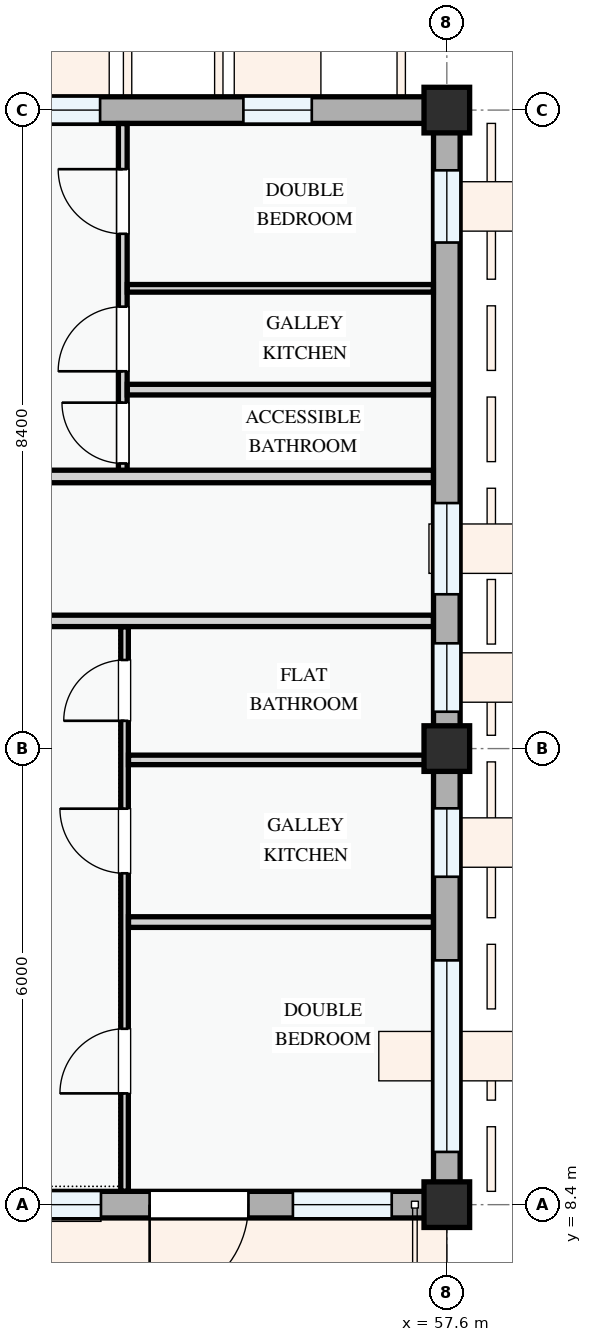
"""IFC4 building model, lengths in metres.
Left out: names, types, materials, properties, quantities, classifications, styles, units other than length and angle.
Written with IfcOpenShell. Run it as: python <this file> out.ifc"""

import sys

from ifc_helpers import new_model, si_unit, direction, frame, frame_2d, origin, origin_2d, place, context, subcontext, project, spatial, rectangle, extrude, element, fill, save


model = new_model("IFC4")
c1 = context("Model", 3, precision=1e-05, world=origin(), true_north=direction((0.0, 1.0)))
c2 = subcontext(c1, "Body", "Model", "MODEL_VIEW")
j1 = project(units=[si_unit("LENGTHUNIT", "METRE"), si_unit("PLANEANGLEUNIT", "RADIAN")], contexts=[c1])
p1 = place(None, origin())
s1 = spatial("IfcSite", under=j1, at=p1, CompositionType="ELEMENT")
p2 = place(p1, origin())
s2 = spatial("IfcBuilding", under=s1, at=p2, CompositionType="ELEMENT")
p3 = place(p2, frame((0.0, 0.0, 8.1)))
s3 = spatial("IfcBuildingStorey", under=s2, at=p3, CompositionType="ELEMENT", Elevation=8.1)
for number, where, z_axis, x_axis in (
    (1, (57.6, 8.4, 0.0), (0.0, 0.0, 1.0), (1.0, 0.0, 0.0)),
    (2, (57.6, 14.4, 0.0), (0.0, 0.0, 1.0), (1.0, 0.0, 0.0)),
    (3, (57.6, 22.8, 0.0), (0.0, 0.0, 1.0), (1.0, 0.0, 0.0)),
):
    element("IfcColumn", number, at=place(p3, frame(where, z_axis=z_axis, x_axis=x_axis)), inside=s3, PredefinedType="COLUMN", context=c2, shape_type="SweptSolid", body=[
        extrude(rectangle(XDim=0.6, YDim=0.6, at=origin_2d()), origin(), (0.0, 0.0, 1.0), 3.3),
    ])
p4 = place(p3, frame((51.6, 8.4, 0.0), z_axis=(0.0, 0.0, 1.0), x_axis=(1.0, 0.0, 0.0)))
e4 = element("IfcWall", 4, at=p4, inside=s3, PredefinedType="STANDARD", context=c2, shape_type="SweptSolid", body=[
    extrude(rectangle(XDim=6.0, YDim=0.35, at=frame_2d((3.0, 0.0))), origin(), (0.0, 0.0, 1.0), 2.475),
])
p5 = place(p4, frame((2.09, 0.0, 0.0)))
e5 = element("IfcOpeningElement", 5, at=p5, cuts=e4, PredefinedType="OPENING", context=c2, shape_type="SweptSolid", body=[
    extrude(rectangle(XDim=1.3, YDim=2.15, at=frame_2d((0.65, 1.075))), frame((0.0, 0.185, 0.0), z_axis=(0.0, -1.0, 0.0), x_axis=(1.0, 0.0, 0.0)), (0.0, 0.0, 1.0), 0.37),
])
p6 = place(p4, frame((0.5, 0.0, 0.78)))
e6 = element("IfcOpeningElement", 6, at=p6, cuts=e4, PredefinedType="OPENING", context=c2, shape_type="SweptSolid", body=[
    extrude(rectangle(XDim=0.95, YDim=1.15, at=frame_2d((0.475, 0.575))), frame((0.0, 0.185, 0.0), z_axis=(0.0, -1.0, 0.0), x_axis=(1.0, 0.0, 0.0)), (0.0, 0.0, 1.0), 0.37),
])
p7 = place(p4, frame((3.975, 0.0, 0.78)))
e7 = element("IfcOpeningElement", 7, at=p7, cuts=e4, PredefinedType="OPENING", context=c2, shape_type="SweptSolid", body=[
    extrude(rectangle(XDim=1.3, YDim=1.4, at=frame_2d((0.65, 0.7))), frame((0.0, 0.185, 0.0), z_axis=(0.0, -1.0, 0.0), x_axis=(1.0, 0.0, 0.0)), (0.0, 0.0, 1.0), 0.37),
])
p8 = place(p3, frame((57.6, 8.4, 0.0), z_axis=(0.0, 0.0, 1.0), x_axis=(0.0, 1.0, 0.0)))
e8 = element("IfcWall", 8, at=p8, inside=s3, PredefinedType="STANDARD", context=c2, shape_type="SweptSolid", body=[
    extrude(rectangle(XDim=6.0, YDim=0.35, at=frame_2d((3.0, 0.0))), origin(), (0.0, 0.0, 1.0), 2.575),
])
p9 = place(p8, frame((0.694, 0.0, 0.78)))
e9 = element("IfcOpeningElement", 9, at=p9, cuts=e8, PredefinedType="OPENING", context=c2, shape_type="SweptSolid", body=[
    extrude(rectangle(XDim=2.52, YDim=1.5, at=frame_2d((1.26, 0.75))), frame((0.0, 0.185, 0.0), z_axis=(0.0, -1.0, 0.0), x_axis=(1.0, 0.0, 0.0)), (0.0, 0.0, 1.0), 0.37),
])
p10 = place(p8, frame((4.314, 0.0, 0.78)))
e10 = element("IfcOpeningElement", 10, at=p10, cuts=e8, PredefinedType="OPENING", context=c2, shape_type="SweptSolid", body=[
    extrude(rectangle(XDim=0.9, YDim=1.2, at=frame_2d((0.45, 0.6))), frame((0.0, 0.185, 0.0), z_axis=(0.0, -1.0, 0.0), x_axis=(1.0, 0.0, 0.0)), (0.0, 0.0, 1.0), 0.37),
])
p11 = place(p3, frame((57.6, 14.4, 0.0), z_axis=(0.0, 0.0, 1.0), x_axis=(0.0, 1.0, 0.0)))
e11 = element("IfcWall", 11, at=p11, inside=s3, PredefinedType="STANDARD", context=c2, shape_type="SweptSolid", body=[
    extrude(rectangle(XDim=8.4, YDim=0.35, at=frame_2d((4.2, 0.0))), origin(), (0.0, 0.0, 1.0), 2.425),
])
p12 = place(p11, frame((0.485, 0.0, 0.78)))
e12 = element("IfcOpeningElement", 12, at=p12, cuts=e11, PredefinedType="OPENING", context=c2, shape_type="SweptSolid", body=[
    extrude(rectangle(XDim=0.9, YDim=1.2, at=frame_2d((0.45, 0.6))), frame((0.0, 0.185, 0.0), z_axis=(0.0, -1.0, 0.0), x_axis=(1.0, 0.0, 0.0)), (0.0, 0.0, 1.0), 0.37),
])
p13 = place(p11, frame((2.03, 0.0, 0.78)))
e13 = element("IfcOpeningElement", 13, at=p13, cuts=e11, PredefinedType="OPENING", context=c2, shape_type="SweptSolid", body=[
    extrude(rectangle(XDim=1.2, YDim=1.5, at=frame_2d((0.6, 0.75))), frame((0.0, 0.185, 0.0), z_axis=(0.0, -1.0, 0.0), x_axis=(1.0, 0.0, 0.0)), (0.0, 0.0, 1.0), 0.37),
])
p14 = place(p11, frame((6.658, 0.0, 0.78)))
e14 = element("IfcOpeningElement", 14, at=p14, cuts=e11, PredefinedType="OPENING", context=c2, shape_type="SweptSolid", body=[
    extrude(rectangle(XDim=0.95, YDim=1.15, at=frame_2d((0.475, 0.575))), frame((0.0, 0.185, 0.0), z_axis=(0.0, -1.0, 0.0), x_axis=(1.0, 0.0, 0.0)), (0.0, 0.0, 1.0), 0.37),
])
p15 = place(p3, frame((57.6, 22.8, 0.0), z_axis=(0.0, 0.0, 1.0), x_axis=(-1.0, 0.0, 0.0)))
e15 = element("IfcWall", 15, at=p15, inside=s3, PredefinedType="STANDARD", context=c2, shape_type="SweptSolid", body=[
    extrude(rectangle(XDim=6.0, YDim=0.35, at=frame_2d((3.0, 0.0))), origin(), (0.0, 0.0, 1.0), 2.475),
])
p16 = place(p15, frame((1.777, 0.0, 0.78)))
e16 = element("IfcOpeningElement", 16, at=p16, cuts=e15, PredefinedType="OPENING", context=c2, shape_type="SweptSolid", body=[
    extrude(rectangle(XDim=0.9, YDim=1.2, at=frame_2d((0.45, 0.6))), frame((0.0, 0.185, 0.0), z_axis=(0.0, -1.0, 0.0), x_axis=(1.0, 0.0, 0.0)), (0.0, 0.0, 1.0), 0.37),
])
p17 = place(p15, frame((4.562, 0.0, 0.78)))
e17 = element("IfcOpeningElement", 17, at=p17, cuts=e15, PredefinedType="OPENING", context=c2, shape_type="SweptSolid", body=[
    extrude(rectangle(XDim=0.95, YDim=1.15, at=frame_2d((0.475, 0.575))), frame((0.0, 0.185, 0.0), z_axis=(0.0, -1.0, 0.0), x_axis=(1.0, 0.0, 0.0)), (0.0, 0.0, 1.0), 0.37),
])
p18 = place(p3, frame((53.36, 8.577, 0.0), z_axis=(0.0, 0.0, 1.0), x_axis=(0.0, 1.0, 0.0)))
e18 = element("IfcWall", 18, at=p18, inside=s3, PredefinedType="PARTITIONING", context=c2, shape_type="SweptSolid", body=[
    extrude(rectangle(XDim=7.426, YDim=0.1, at=frame_2d((3.713, 0.0))), origin(), (0.0, 0.0, 1.0), 3.0),
])
p19 = place(p18, frame((1.287, 0.0, 0.0)))
e19 = element("IfcOpeningElement", 19, at=p19, cuts=e18, PredefinedType="OPENING", context=c2, shape_type="SweptSolid", body=[
    extrude(rectangle(XDim=0.85, YDim=2.1, at=frame_2d((0.425, 1.05))), frame((0.0, 0.06, 0.0), z_axis=(0.0, -1.0, 0.0), x_axis=(1.0, 0.0, 0.0)), (0.0, 0.0, 1.0), 0.12),
])
p20 = place(p18, frame((4.182, 0.0, 0.0)))
e20 = element("IfcOpeningElement", 20, at=p20, cuts=e18, PredefinedType="OPENING", context=c2, shape_type="SweptSolid", body=[
    extrude(rectangle(XDim=0.85, YDim=2.1, at=frame_2d((0.425, 1.05))), frame((0.0, 0.06, 0.0), z_axis=(0.0, -1.0, 0.0), x_axis=(1.0, 0.0, 0.0)), (0.0, 0.0, 1.0), 0.12),
])
p21 = place(p18, frame((6.189, 0.0, 0.0)))
e21 = element("IfcOpeningElement", 21, at=p21, cuts=e18, PredefinedType="OPENING", context=c2, shape_type="SweptSolid", body=[
    extrude(rectangle(XDim=0.8, YDim=2.1, at=frame_2d((0.4, 1.05))), frame((0.0, 0.06, 0.0), z_axis=(0.0, -1.0, 0.0), x_axis=(1.0, 0.0, 0.0)), (0.0, 0.0, 1.0), 0.12),
])
p22 = place(p3, frame((53.412, 12.118, 0.0), z_axis=(0.0, 0.0, 1.0), x_axis=(1.0, 0.0, 0.0)))
e22 = element("IfcWall", 22, at=p22, inside=s3, PredefinedType="PARTITIONING", context=c2, shape_type="SweptSolid", body=[
    extrude(rectangle(XDim=4.011, YDim=0.14, at=frame_2d((2.005, 0.0))), origin(), (0.0, 0.0, 1.0), 3.0),
])
p23 = place(p3, frame((53.412, 14.251, 0.0), z_axis=(0.0, 0.0, 1.0), x_axis=(1.0, 0.0, 0.0)))
e23 = element("IfcWall", 23, at=p23, inside=s3, PredefinedType="PARTITIONING", context=c2, shape_type="SweptSolid", body=[
    extrude(rectangle(XDim=4.011, YDim=0.125, at=frame_2d((2.005, 0.0))), origin(), (0.0, 0.0, 1.0), 2.475),
])
p24 = place(p3, frame((53.337, 17.98, 0.0), z_axis=(0.0, 0.0, 1.0), x_axis=(0.0, 1.0, 0.0)))
e24 = element("IfcWall", 24, at=p24, inside=s3, PredefinedType="PARTITIONING", context=c2, shape_type="SweptSolid", body=[
    extrude(rectangle(XDim=4.643, YDim=0.115, at=frame_2d((2.322, 0.0))), origin(), (0.0, 0.0, 1.0), 3.0),
])
p25 = place(p24, frame((0.171, 0.0, 0.0)))
e25 = element("IfcOpeningElement", 25, at=p25, cuts=e24, PredefinedType="OPENING", context=c2, shape_type="SweptSolid", body=[
    extrude(rectangle(XDim=0.8, YDim=2.1, at=frame_2d((0.4, 1.05))), frame((0.0, 0.067, 0.0), z_axis=(0.0, -1.0, 0.0), x_axis=(1.0, 0.0, 0.0)), (0.0, 0.0, 1.0), 0.135),
])
p26 = place(p24, frame((1.384, 0.0, 0.0)))
e26 = element("IfcOpeningElement", 26, at=p26, cuts=e24, PredefinedType="OPENING", context=c2, shape_type="SweptSolid", body=[
    extrude(rectangle(XDim=0.85, YDim=2.1, at=frame_2d((0.425, 1.05))), frame((0.0, 0.067, 0.0), z_axis=(0.0, -1.0, 0.0), x_axis=(1.0, 0.0, 0.0)), (0.0, 0.0, 1.0), 0.135),
])
p27 = place(p24, frame((3.193, 0.0, 0.0)))
e27 = element("IfcOpeningElement", 27, at=p27, cuts=e24, PredefinedType="OPENING", context=c2, shape_type="SweptSolid", body=[
    extrude(rectangle(XDim=0.85, YDim=2.1, at=frame_2d((0.425, 1.05))), frame((0.0, 0.067, 0.0), z_axis=(0.0, -1.0, 0.0), x_axis=(1.0, 0.0, 0.0)), (0.0, 0.0, 1.0), 0.135),
])
p28 = place(p3, frame((53.396, 20.455, 0.0), z_axis=(0.0, 0.0, 1.0), x_axis=(1.0, 0.0, 0.0)))
e28 = element("IfcWall", 28, at=p28, inside=s3, PredefinedType="PARTITIONING", context=c2, shape_type="SweptSolid", body=[
    extrude(rectangle(XDim=4.027, YDim=0.1, at=frame_2d((2.013, 0.0))), origin(), (0.0, 0.0, 1.0), 3.0),
])
p29 = place(p3, frame((53.396, 19.122, 0.0), z_axis=(0.0, 0.0, 1.0), x_axis=(1.0, 0.0, 0.0)))
e29 = element("IfcWall", 29, at=p29, inside=s3, PredefinedType="PARTITIONING", context=c2, shape_type="SweptSolid", body=[
    extrude(rectangle(XDim=4.027, YDim=0.14, at=frame_2d((2.013, 0.0))), origin(), (0.0, 0.0, 1.0), 3.0),
])
p30 = place(p3, frame((22.66, 16.08, 0.0), z_axis=(0.0, 0.0, 1.0), x_axis=(1.0, 0.0, 0.0)))
e30 = element("IfcWall", 30, at=p30, inside=s3, PredefinedType="PARTITIONING", context=c2, shape_type="SweptSolid", body=[
    extrude(rectangle(XDim=34.763, YDim=0.15, at=frame_2d((17.382, 0.0))), origin(), (0.0, 0.0, 1.0), 3.0),
])
p31 = place(p30, frame((2.672, 0.0, 0.0)))
e31 = element("IfcOpeningElement", 31, at=p31, cuts=e30, PredefinedType="OPENING", context=c2, shape_type="SweptSolid", body=[
    extrude(rectangle(XDim=0.92, YDim=2.1, at=frame_2d((0.46, 1.05))), frame((0.0, 0.085, 0.0), z_axis=(0.0, -1.0, 0.0), x_axis=(1.0, 0.0, 0.0)), (0.0, 0.0, 1.0), 0.17),
])
p32 = place(p30, frame((16.58, 0.0, 0.0)))
e32 = element("IfcOpeningElement", 32, at=p32, cuts=e30, PredefinedType="OPENING", context=c2, shape_type="SweptSolid", body=[
    extrude(rectangle(XDim=0.96, YDim=2.12, at=frame_2d((0.48, 1.06))), frame((0.0, 0.085, 0.0), z_axis=(0.0, -1.0, 0.0), x_axis=(1.0, 0.0, 0.0)), (0.0, 0.0, 1.0), 0.17),
])
p33 = place(p30, frame((24.315, 0.0, 0.0)))
e33 = element("IfcOpeningElement", 33, at=p33, cuts=e30, PredefinedType="OPENING", context=c2, shape_type="SweptSolid", body=[
    extrude(rectangle(XDim=0.92, YDim=2.1, at=frame_2d((0.46, 1.05))), frame((0.0, 0.085, 0.0), z_axis=(0.0, -1.0, 0.0), x_axis=(1.0, 0.0, 0.0)), (0.0, 0.0, 1.0), 0.17),
])
p34 = place(p3, frame((22.66, 17.98, 0.0), z_axis=(0.0, 0.0, 1.0), x_axis=(1.0, 0.0, 0.0)))
e34 = element("IfcWall", 34, at=p34, inside=s3, PredefinedType="PARTITIONING", context=c2, shape_type="SweptSolid", body=[
    extrude(rectangle(XDim=34.763, YDim=0.165, at=frame_2d((17.382, 0.0))), origin(), (0.0, 0.0, 1.0), 3.0),
])
p35 = place(p34, frame((2.633, 0.0, 0.0)))
e35 = element("IfcOpeningElement", 35, at=p35, cuts=e34, PredefinedType="OPENING", context=c2, shape_type="SweptSolid", body=[
    extrude(rectangle(XDim=0.92, YDim=2.1, at=frame_2d((0.46, 1.05))), frame((0.0, 0.093, 0.0), z_axis=(0.0, -1.0, 0.0), x_axis=(1.0, 0.0, 0.0)), (0.0, 0.0, 1.0), 0.185),
])
p36 = place(p34, frame((16.343, 0.0, 0.0)))
e36 = element("IfcOpeningElement", 36, at=p36, cuts=e34, PredefinedType="OPENING", context=c2, shape_type="SweptSolid", body=[
    extrude(rectangle(XDim=0.92, YDim=2.1, at=frame_2d((0.46, 1.05))), frame((0.0, 0.093, 0.0), z_axis=(0.0, -1.0, 0.0), x_axis=(1.0, 0.0, 0.0)), (0.0, 0.0, 1.0), 0.185),
])
p37 = place(p34, frame((24.313, 0.0, 0.0)))
e37 = element("IfcOpeningElement", 37, at=p37, cuts=e34, PredefinedType="OPENING", context=c2, shape_type="SweptSolid", body=[
    extrude(rectangle(XDim=0.92, YDim=2.1, at=frame_2d((0.46, 1.05))), frame((0.0, 0.093, 0.0), z_axis=(0.0, -1.0, 0.0), x_axis=(1.0, 0.0, 0.0)), (0.0, 0.0, 1.0), 0.185),
])
p38 = place(p5, frame((1.3, 0.0, 0.0), z_axis=(0.0, 0.0, 1.0), x_axis=(-1.0, 0.0, 0.0)))
e38 = element("IfcDoor", 38, at=p38, inside=s3, OperationType="SINGLE_SWING_RIGHT", PredefinedType="DOOR", context=c2, shape_type="SweptSolid", body=[
    extrude(rectangle(XDim=1.3, YDim=2.15, at=frame_2d((0.65, 1.075))), frame((0.0, 0.025, 0.0), z_axis=(0.0, -1.0, 0.0), x_axis=(1.0, 0.0, 0.0)), (0.0, 0.0, 1.0), 0.05),
])
fill(e5, e38)
p39 = place(p6, origin())
e39 = element("IfcWindow", 39, at=p39, inside=s3, PartitioningType="SINGLE_PANEL", PredefinedType="WINDOW", context=c2, shape_type="SweptSolid", body=[
    extrude(rectangle(XDim=0.95, YDim=1.15, at=frame_2d((0.475, 0.575))), frame((0.0, 0.03, 0.0), z_axis=(0.0, -1.0, 0.0), x_axis=(1.0, 0.0, 0.0)), (0.0, 0.0, 1.0), 0.06),
])
fill(e6, e39)
p40 = place(p7, origin())
e40 = element("IfcWindow", 40, at=p40, inside=s3, PartitioningType="SINGLE_PANEL", PredefinedType="WINDOW", context=c2, shape_type="SweptSolid", body=[
    extrude(rectangle(XDim=1.3, YDim=1.4, at=frame_2d((0.65, 0.7))), frame((0.0, 0.03, 0.0), z_axis=(0.0, -1.0, 0.0), x_axis=(1.0, 0.0, 0.0)), (0.0, 0.0, 1.0), 0.06),
])
fill(e7, e40)
p41 = place(p9, origin())
e41 = element("IfcWindow", 41, at=p41, inside=s3, PartitioningType="DOUBLE_PANEL_VERTICAL", PredefinedType="WINDOW", context=c2, shape_type="SweptSolid", body=[
    extrude(rectangle(XDim=2.52, YDim=1.5, at=frame_2d((1.26, 0.75))), frame((0.0, 0.03, 0.0), z_axis=(0.0, -1.0, 0.0), x_axis=(1.0, 0.0, 0.0)), (0.0, 0.0, 1.0), 0.06),
])
fill(e9, e41)
p42 = place(p10, origin())
e42 = element("IfcWindow", 42, at=p42, inside=s3, PartitioningType="SINGLE_PANEL", PredefinedType="WINDOW", context=c2, shape_type="SweptSolid", body=[
    extrude(rectangle(XDim=0.9, YDim=1.2, at=frame_2d((0.45, 0.6))), frame((0.0, 0.03, 0.0), z_axis=(0.0, -1.0, 0.0), x_axis=(1.0, 0.0, 0.0)), (0.0, 0.0, 1.0), 0.06),
])
fill(e10, e42)
p43 = place(p12, origin())
e43 = element("IfcWindow", 43, at=p43, inside=s3, PartitioningType="SINGLE_PANEL", PredefinedType="WINDOW", context=c2, shape_type="SweptSolid", body=[
    extrude(rectangle(XDim=0.9, YDim=1.2, at=frame_2d((0.45, 0.6))), frame((0.0, 0.03, 0.0), z_axis=(0.0, -1.0, 0.0), x_axis=(1.0, 0.0, 0.0)), (0.0, 0.0, 1.0), 0.06),
])
fill(e12, e43)
p44 = place(p13, origin())
e44 = element("IfcWindow", 44, at=p44, inside=s3, PartitioningType="SINGLE_PANEL", PredefinedType="WINDOW", context=c2, shape_type="SweptSolid", body=[
    extrude(rectangle(XDim=1.2, YDim=1.5, at=frame_2d((0.6, 0.75))), frame((0.0, 0.03, 0.0), z_axis=(0.0, -1.0, 0.0), x_axis=(1.0, 0.0, 0.0)), (0.0, 0.0, 1.0), 0.06),
])
fill(e13, e44)
p45 = place(p14, origin())
e45 = element("IfcWindow", 45, at=p45, inside=s3, PartitioningType="SINGLE_PANEL", PredefinedType="WINDOW", context=c2, shape_type="SweptSolid", body=[
    extrude(rectangle(XDim=0.95, YDim=1.15, at=frame_2d((0.475, 0.575))), frame((0.0, 0.03, 0.0), z_axis=(0.0, -1.0, 0.0), x_axis=(1.0, 0.0, 0.0)), (0.0, 0.0, 1.0), 0.06),
])
fill(e14, e45)
p46 = place(p16, origin())
e46 = element("IfcWindow", 46, at=p46, inside=s3, PartitioningType="SINGLE_PANEL", PredefinedType="WINDOW", context=c2, shape_type="SweptSolid", body=[
    extrude(rectangle(XDim=0.9, YDim=1.2, at=frame_2d((0.45, 0.6))), frame((0.0, 0.03, 0.0), z_axis=(0.0, -1.0, 0.0), x_axis=(1.0, 0.0, 0.0)), (0.0, 0.0, 1.0), 0.06),
])
fill(e16, e46)
p47 = place(p17, origin())
e47 = element("IfcWindow", 47, at=p47, inside=s3, PartitioningType="SINGLE_PANEL", PredefinedType="WINDOW", context=c2, shape_type="SweptSolid", body=[
    extrude(rectangle(XDim=0.95, YDim=1.15, at=frame_2d((0.475, 0.575))), frame((0.0, 0.03, 0.0), z_axis=(0.0, -1.0, 0.0), x_axis=(1.0, 0.0, 0.0)), (0.0, 0.0, 1.0), 0.06),
])
fill(e17, e47)
p48 = place(p19, origin())
e48 = element("IfcDoor", 48, at=p48, inside=s3, OperationType="SINGLE_SWING_LEFT", PredefinedType="DOOR", context=c2, shape_type="SweptSolid", body=[
    extrude(rectangle(XDim=0.85, YDim=2.1, at=frame_2d((0.425, 1.05))), frame((0.0, 0.025, 0.0), z_axis=(0.0, -1.0, 0.0), x_axis=(1.0, 0.0, 0.0)), (0.0, 0.0, 1.0), 0.05),
])
fill(e19, e48)
p49 = place(p20, origin())
e49 = element("IfcDoor", 49, at=p49, inside=s3, OperationType="SINGLE_SWING_RIGHT", PredefinedType="DOOR", context=c2, shape_type="SweptSolid", body=[
    extrude(rectangle(XDim=0.85, YDim=2.1, at=frame_2d((0.425, 1.05))), frame((0.0, 0.025, 0.0), z_axis=(0.0, -1.0, 0.0), x_axis=(1.0, 0.0, 0.0)), (0.0, 0.0, 1.0), 0.05),
])
fill(e20, e49)
p50 = place(p21, origin())
e50 = element("IfcDoor", 50, at=p50, inside=s3, OperationType="SINGLE_SWING_LEFT", PredefinedType="DOOR", context=c2, shape_type="SweptSolid", body=[
    extrude(rectangle(XDim=0.8, YDim=2.1, at=frame_2d((0.4, 1.05))), frame((0.0, 0.025, 0.0), z_axis=(0.0, -1.0, 0.0), x_axis=(1.0, 0.0, 0.0)), (0.0, 0.0, 1.0), 0.05),
])
fill(e21, e50)
p51 = place(p25, origin())
e51 = element("IfcDoor", 51, at=p51, inside=s3, OperationType="SINGLE_SWING_RIGHT", PredefinedType="DOOR", context=c2, shape_type="SweptSolid", body=[
    extrude(rectangle(XDim=0.8, YDim=2.1, at=frame_2d((0.4, 1.05))), frame((0.0, 0.025, 0.0), z_axis=(0.0, -1.0, 0.0), x_axis=(1.0, 0.0, 0.0)), (0.0, 0.0, 1.0), 0.05),
])
fill(e25, e51)
p52 = place(p26, origin())
e52 = element("IfcDoor", 52, at=p52, inside=s3, OperationType="SINGLE_SWING_LEFT", PredefinedType="DOOR", context=c2, shape_type="SweptSolid", body=[
    extrude(rectangle(XDim=0.85, YDim=2.1, at=frame_2d((0.425, 1.05))), frame((0.0, 0.025, 0.0), z_axis=(0.0, -1.0, 0.0), x_axis=(1.0, 0.0, 0.0)), (0.0, 0.0, 1.0), 0.05),
])
fill(e26, e52)
p53 = place(p27, origin())
e53 = element("IfcDoor", 53, at=p53, inside=s3, OperationType="SINGLE_SWING_RIGHT", PredefinedType="DOOR", context=c2, shape_type="SweptSolid", body=[
    extrude(rectangle(XDim=0.85, YDim=2.1, at=frame_2d((0.425, 1.05))), frame((0.0, 0.025, 0.0), z_axis=(0.0, -1.0, 0.0), x_axis=(1.0, 0.0, 0.0)), (0.0, 0.0, 1.0), 0.05),
])
fill(e27, e53)
save(model, sys.argv[1])
